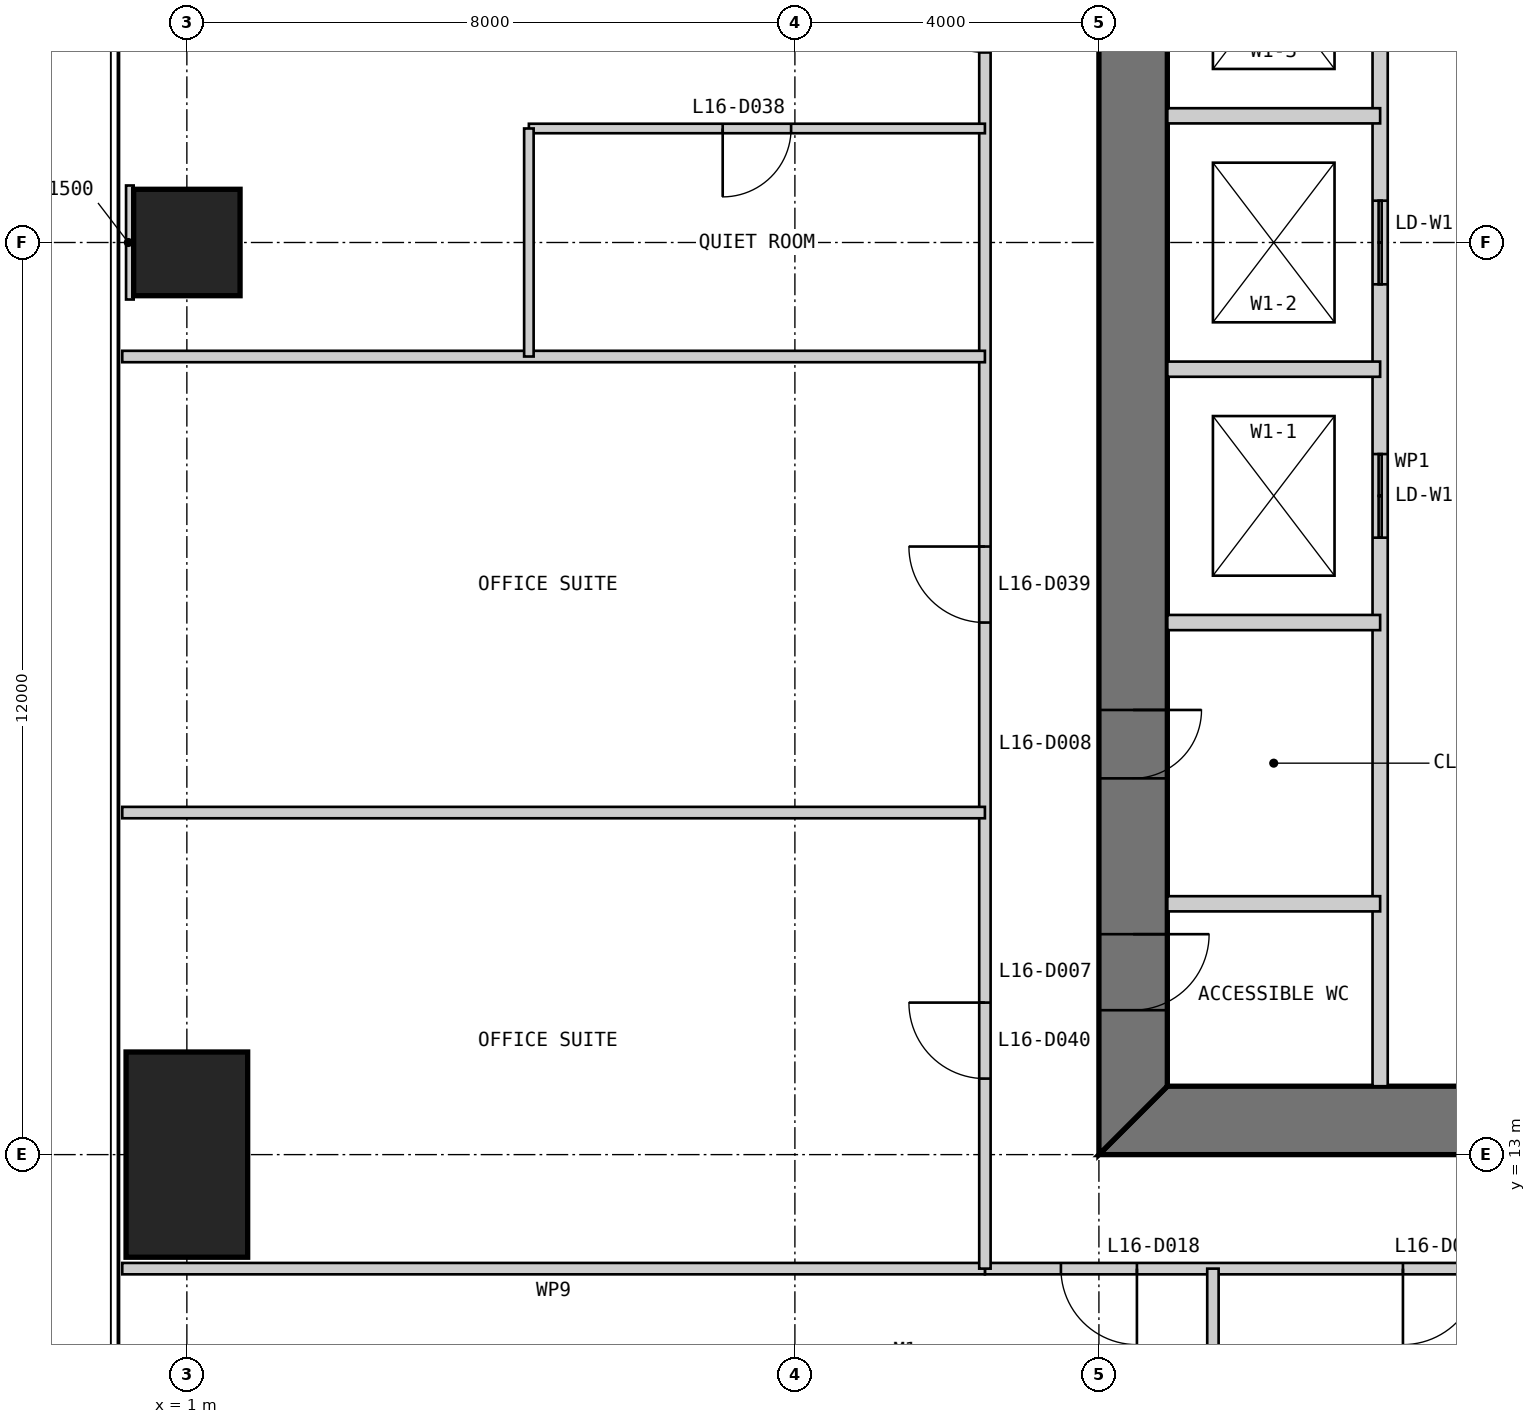
"""IFC4 building model, lengths in metres.
Left out: names, types, materials, properties, quantities, classifications, styles, units other than length and angle.
Written with IfcOpenShell. Run it as: python <this file> out.ifc"""

import sys

from ifc_helpers import new_model, si_unit, direction, frame, frame_2d, origin, origin_2d, place, context, subcontext, project, spatial, polyline, rectangle, outline, extrude, element, fill, save


model = new_model("IFC4")
c1 = context("Model", 3, precision=1e-05, world=origin(), true_north=direction((0.0, 1.0)))
c2 = subcontext(c1, "Body", "Model", "MODEL_VIEW")
j1 = project(units=[si_unit("LENGTHUNIT", "METRE"), si_unit("PLANEANGLEUNIT", "RADIAN")], contexts=[c1])
p1 = place(None, origin())
s1 = spatial("IfcSite", under=j1, at=p1, CompositionType="ELEMENT")
p2 = place(p1, origin())
s2 = spatial("IfcBuilding", under=s1, at=p2, CompositionType="ELEMENT")
p3 = place(p2, frame((0.0, 0.0, 71.0)))
s3 = spatial("IfcBuildingStorey", under=s2, at=p3, CompositionType="ELEMENT", Elevation=71.0)
p4 = place(p3, frame((1.0, 25.0, 0.0), z_axis=(0.0, 0.0, 1.0), x_axis=(1.0, 0.0, 0.0)))
e1 = element("IfcColumn", 1, at=p4, inside=s3, PredefinedType="COLUMN", context=c2, shape_type="SweptSolid", body=[
    extrude(rectangle(XDim=1.4, YDim=1.4, at=origin_2d()), origin(), (0.0, 0.0, 1.0), 4.0),
])
p5 = place(p3, frame((1.0, 13.0, 0.0), z_axis=(0.0, 0.0, 1.0), x_axis=(1.0, 0.0, 0.0)))
e2 = element("IfcColumn", 2, at=p5, inside=s3, PredefinedType="COLUMN", context=c2, shape_type="SweptSolid", body=[
    extrude(rectangle(XDim=1.6, YDim=2.7, at=origin_2d()), origin(), (0.0, 0.0, 1.0), 4.0),
])
p6 = place(p3, frame((13.0, 13.45, 0.0), z_axis=(0.0, 0.0, 1.0), x_axis=(1.0, 0.0, 0.0)))
e3 = element("IfcWall", 3, at=p6, inside=s3, PredefinedType="SHEAR", context=c2, shape_type="SweptSolid", body=[
    extrude(outline(polyline([(0.0, -0.45), (24.0, -0.45), (23.1, 0.45), (0.9, 0.45), (0.0, -0.45)])), origin(), (0.0, 0.0, 1.0), 4.0),
])
p7 = place(p6, frame((4.9, 0.0, 0.0)))
e4 = element("IfcOpeningElement", 4, at=p7, cuts=e3, PredefinedType="OPENING", context=c2, shape_type="SweptSolid", body=[
    extrude(rectangle(XDim=1.0, YDim=2.2, at=frame_2d((0.5, 1.1))), frame((0.0, 0.46, 0.0), z_axis=(0.0, -1.0, 0.0), x_axis=(1.0, 0.0, 0.0)), (0.0, 0.0, 1.0), 0.92),
])
p8 = place(p6, frame((8.9, 0.0, 0.0)))
e5 = element("IfcOpeningElement", 5, at=p8, cuts=e3, PredefinedType="OPENING", context=c2, shape_type="SweptSolid", body=[
    extrude(rectangle(XDim=1.1, YDim=2.2, at=frame_2d((0.55, 1.1))), frame((0.0, 0.46, 0.0), z_axis=(0.0, -1.0, 0.0), x_axis=(1.0, 0.0, 0.0)), (0.0, 0.0, 1.0), 0.92),
])
p9 = place(p6, frame((15.05, 0.0, 0.0)))
e6 = element("IfcOpeningElement", 6, at=p9, cuts=e3, PredefinedType="OPENING", context=c2, shape_type="SweptSolid", body=[
    extrude(rectangle(XDim=0.9, YDim=2.2, at=frame_2d((0.45, 1.1))), frame((0.0, 0.46, 0.0), z_axis=(0.0, -1.0, 0.0), x_axis=(1.0, 0.0, 0.0)), (0.0, 0.0, 1.0), 0.92),
])
p10 = place(p6, frame((17.9, 0.0, 0.0)))
e7 = element("IfcOpeningElement", 7, at=p10, cuts=e3, PredefinedType="OPENING", context=c2, shape_type="SweptSolid", body=[
    extrude(rectangle(XDim=1.0, YDim=2.2, at=frame_2d((0.5, 1.1))), frame((0.0, 0.46, 0.0), z_axis=(0.0, -1.0, 0.0), x_axis=(1.0, 0.0, 0.0)), (0.0, 0.0, 1.0), 0.92),
])
p11 = place(p6, frame((21.4, 0.0, 0.0)))
e8 = element("IfcOpeningElement", 8, at=p11, cuts=e3, PredefinedType="OPENING", context=c2, shape_type="SweptSolid", body=[
    extrude(rectangle(XDim=1.0, YDim=2.2, at=frame_2d((0.5, 1.1))), frame((0.0, 0.46, 0.0), z_axis=(0.0, -1.0, 0.0), x_axis=(1.0, 0.0, 0.0)), (0.0, 0.0, 1.0), 0.92),
])
p12 = place(p3, frame((13.45, 36.1, 0.0), z_axis=(0.0, 0.0, 1.0), x_axis=(0.0, -1.0, 0.0)))
e9 = element("IfcWall", 9, at=p12, inside=s3, PredefinedType="SHEAR", context=c2, shape_type="SweptSolid", body=[
    extrude(outline(polyline([(-0.9, -0.45), (23.1, -0.45), (22.2, 0.45), (0.0, 0.45), (-0.9, -0.45)])), origin(), (0.0, 0.0, 1.0), 4.0),
])
p13 = place(p12, frame((20.2, 0.0, 0.0)))
e10 = element("IfcOpeningElement", 10, at=p13, cuts=e9, PredefinedType="OPENING", context=c2, shape_type="SweptSolid", body=[
    extrude(rectangle(XDim=1.0, YDim=2.2, at=frame_2d((0.5, 1.1))), frame((0.0, 0.46, 0.0), z_axis=(0.0, -1.0, 0.0), x_axis=(1.0, 0.0, 0.0)), (0.0, 0.0, 1.0), 0.92),
])
p14 = place(p12, frame((17.25, 0.0, 0.0)))
e11 = element("IfcOpeningElement", 11, at=p14, cuts=e9, PredefinedType="OPENING", context=c2, shape_type="SweptSolid", body=[
    extrude(rectangle(XDim=0.9, YDim=2.2, at=frame_2d((0.45, 1.1))), frame((0.0, 0.46, 0.0), z_axis=(0.0, -1.0, 0.0), x_axis=(1.0, 0.0, 0.0)), (0.0, 0.0, 1.0), 0.92),
])
p15 = place(p3, frame((16.7, 13.9, 0.0), z_axis=(0.0, 0.0, 1.0), x_axis=(0.0, 1.0, 0.0)))
e12 = element("IfcWall", 12, at=p15, inside=s3, PredefinedType="PARTITIONING", context=c2, shape_type="SweptSolid", body=[
    extrude(rectangle(XDim=16.1, YDim=0.2, at=frame_2d((8.05, 0.0))), origin(), (0.0, 0.0, 1.0), 3.8),
])
p16 = place(p15, frame((7.217, 0.0, 0.0)))
e13 = element("IfcOpeningElement", 13, at=p16, cuts=e12, PredefinedType="OPENING", context=c2, shape_type="SweptSolid", body=[
    extrude(rectangle(XDim=1.1, YDim=2.2, at=frame_2d((0.55, 1.1))), frame((0.0, 0.11, 0.0), z_axis=(0.0, -1.0, 0.0), x_axis=(1.0, 0.0, 0.0)), (0.0, 0.0, 1.0), 0.22),
])
p17 = place(p15, frame((10.55, 0.0, 0.0)))
e14 = element("IfcOpeningElement", 14, at=p17, cuts=e12, PredefinedType="OPENING", context=c2, shape_type="SweptSolid", body=[
    extrude(rectangle(XDim=1.1, YDim=2.2, at=frame_2d((0.55, 1.1))), frame((0.0, 0.11, 0.0), z_axis=(0.0, -1.0, 0.0), x_axis=(1.0, 0.0, 0.0)), (0.0, 0.0, 1.0), 0.22),
])
p18 = place(p15, frame((13.883, 0.0, 0.0)))
e15 = element("IfcOpeningElement", 15, at=p18, cuts=e12, PredefinedType="OPENING", context=c2, shape_type="SweptSolid", body=[
    extrude(rectangle(XDim=1.1, YDim=2.2, at=frame_2d((0.55, 1.1))), frame((0.0, 0.11, 0.0), z_axis=(0.0, -1.0, 0.0), x_axis=(1.0, 0.0, 0.0)), (0.0, 0.0, 1.0), 0.22),
])
for number, where, z_axis, x_axis in (
    (16, (13.9, 20.0, 0.0), (0.0, 0.0, 1.0), (1.0, 0.0, 0.0)),
    (17, (13.9, 23.333, 0.0), (0.0, 0.0, 1.0), (1.0, 0.0, 0.0)),
    (18, (13.9, 26.667, 0.0), (0.0, 0.0, 1.0), (1.0, 0.0, 0.0)),
    (19, (13.9, 16.3, 0.0), (0.0, 0.0, 1.0), (1.0, 0.0, 0.0)),
):
    element("IfcWall", number, at=place(p3, frame(where, z_axis=z_axis, x_axis=x_axis)), inside=s3, PredefinedType="PARTITIONING", context=c2, shape_type="SweptSolid", body=[
        extrude(rectangle(XDim=2.8, YDim=0.2, at=frame_2d((1.4, 0.0))), origin(), (0.0, 0.0, 1.0), 3.8),
    ])
p19 = place(p3, frame((11.5, 11.5, 0.0), z_axis=(0.0, 0.0, 1.0), x_axis=(1.0, 0.0, 0.0)))
e20 = element("IfcWall", 20, at=p19, inside=s3, PredefinedType="PARTITIONING", context=c2, shape_type="SweptSolid", body=[
    extrude(rectangle(XDim=27.0, YDim=0.15, at=frame_2d((13.5, 0.0))), origin(), (0.0, 0.0, 1.0), 3.85),
])
p20 = place(p19, frame((1.0, 0.0, 0.0)))
e21 = element("IfcOpeningElement", 21, at=p20, cuts=e20, PredefinedType="OPENING", context=c2, shape_type="SweptSolid", body=[
    extrude(rectangle(XDim=1.0, YDim=2.2, at=frame_2d((0.5, 1.1))), frame((0.0, 0.085, 0.0), z_axis=(0.0, -1.0, 0.0), x_axis=(1.0, 0.0, 0.0)), (0.0, 0.0, 1.0), 0.17),
])
p21 = place(p19, frame((5.5, 0.0, 0.0)))
e22 = element("IfcOpeningElement", 22, at=p21, cuts=e20, PredefinedType="OPENING", context=c2, shape_type="SweptSolid", body=[
    extrude(rectangle(XDim=1.0, YDim=2.2, at=frame_2d((0.5, 1.1))), frame((0.0, 0.085, 0.0), z_axis=(0.0, -1.0, 0.0), x_axis=(1.0, 0.0, 0.0)), (0.0, 0.0, 1.0), 0.17),
])
p22 = place(p19, frame((11.5, 0.0, 0.0)))
e23 = element("IfcOpeningElement", 23, at=p22, cuts=e20, PredefinedType="OPENING", context=c2, shape_type="SweptSolid", body=[
    extrude(rectangle(XDim=1.0, YDim=2.2, at=frame_2d((0.5, 1.1))), frame((0.0, 0.085, 0.0), z_axis=(0.0, -1.0, 0.0), x_axis=(1.0, 0.0, 0.0)), (0.0, 0.0, 1.0), 0.17),
])
p23 = place(p19, frame((19.0, 0.0, 0.0)))
e24 = element("IfcOpeningElement", 24, at=p23, cuts=e20, PredefinedType="OPENING", context=c2, shape_type="SweptSolid", body=[
    extrude(rectangle(XDim=1.0, YDim=2.2, at=frame_2d((0.5, 1.1))), frame((0.0, 0.085, 0.0), z_axis=(0.0, -1.0, 0.0), x_axis=(1.0, 0.0, 0.0)), (0.0, 0.0, 1.0), 0.17),
])
for number, where, z_axis, x_axis in (
    (25, (0.15, 11.5, 0.0), (0.0, 0.0, 1.0), (1.0, 0.0, 0.0)),
    (26, (14.5, 0.15, 0.0), (0.0, 0.0, 1.0), (0.0, 1.0, 0.0)),
):
    element("IfcWall", number, at=place(p3, frame(where, z_axis=z_axis, x_axis=x_axis)), inside=s3, PredefinedType="PARTITIONING", context=c2, shape_type="SweptSolid", body=[
        extrude(rectangle(XDim=11.35, YDim=0.15, at=frame_2d((5.675, 0.0))), origin(), (0.0, 0.0, 1.0), 3.85),
    ])
p24 = place(p3, frame((11.5, 38.5, 0.0), z_axis=(0.0, 0.0, 1.0), x_axis=(0.0, -1.0, 0.0)))
e27 = element("IfcWall", 27, at=p24, inside=s3, PredefinedType="PARTITIONING", context=c2, shape_type="SweptSolid", body=[
    extrude(rectangle(XDim=27.0, YDim=0.15, at=frame_2d((13.5, 0.0))), origin(), (0.0, 0.0, 1.0), 3.85),
])
p25 = place(p24, frame((4.0, 0.0, 0.0)))
e28 = element("IfcOpeningElement", 28, at=p25, cuts=e27, PredefinedType="OPENING", context=c2, shape_type="SweptSolid", body=[
    extrude(rectangle(XDim=1.0, YDim=2.2, at=frame_2d((0.5, 1.1))), frame((0.0, 0.085, 0.0), z_axis=(0.0, -1.0, 0.0), x_axis=(1.0, 0.0, 0.0)), (0.0, 0.0, 1.0), 0.17),
])
p26 = place(p24, frame((10.0, 0.0, 0.0)))
e29 = element("IfcOpeningElement", 29, at=p26, cuts=e27, PredefinedType="OPENING", context=c2, shape_type="SweptSolid", body=[
    extrude(rectangle(XDim=1.0, YDim=2.2, at=frame_2d((0.5, 1.1))), frame((0.0, 0.085, 0.0), z_axis=(0.0, -1.0, 0.0), x_axis=(1.0, 0.0, 0.0)), (0.0, 0.0, 1.0), 0.17),
])
p27 = place(p24, frame((17.5, 0.0, 0.0)))
e30 = element("IfcOpeningElement", 30, at=p27, cuts=e27, PredefinedType="OPENING", context=c2, shape_type="SweptSolid", body=[
    extrude(rectangle(XDim=1.0, YDim=2.2, at=frame_2d((0.5, 1.1))), frame((0.0, 0.085, 0.0), z_axis=(0.0, -1.0, 0.0), x_axis=(1.0, 0.0, 0.0)), (0.0, 0.0, 1.0), 0.17),
])
p28 = place(p24, frame((23.5, 0.0, 0.0)))
e31 = element("IfcOpeningElement", 31, at=p28, cuts=e27, PredefinedType="OPENING", context=c2, shape_type="SweptSolid", body=[
    extrude(rectangle(XDim=1.0, YDim=2.2, at=frame_2d((0.5, 1.1))), frame((0.0, 0.085, 0.0), z_axis=(0.0, -1.0, 0.0), x_axis=(1.0, 0.0, 0.0)), (0.0, 0.0, 1.0), 0.17),
])
p29 = place(p3, frame((5.5, 26.5, 0.0), z_axis=(0.0, 0.0, 1.0), x_axis=(1.0, 0.0, 0.0)))
e32 = element("IfcWall", 32, at=p29, inside=s3, PredefinedType="PARTITIONING", context=c2, shape_type="SweptSolid", body=[
    extrude(rectangle(XDim=6.0, YDim=0.125, at=frame_2d((3.0, 0.0))), origin(), (0.0, 0.0, 1.0), 3.85),
])
p30 = place(p29, frame((2.55, 0.0, 0.0)))
e33 = element("IfcOpeningElement", 33, at=p30, cuts=e32, PredefinedType="OPENING", context=c2, shape_type="SweptSolid", body=[
    extrude(rectangle(XDim=0.9, YDim=2.2, at=frame_2d((0.45, 1.1))), frame((0.0, 0.073, 0.0), z_axis=(0.0, -1.0, 0.0), x_axis=(1.0, 0.0, 0.0)), (0.0, 0.0, 1.0), 0.145),
])
for number, where, z_axis, x_axis in (
    (34, (0.15, 23.5, 0.0), (0.0, 0.0, 1.0), (1.0, 0.0, 0.0)),
    (35, (0.15, 17.5, 0.0), (0.0, 0.0, 1.0), (1.0, 0.0, 0.0)),
):
    element("IfcWall", number, at=place(p3, frame(where, z_axis=z_axis, x_axis=x_axis)), inside=s3, PredefinedType="PARTITIONING", context=c2, shape_type="SweptSolid", body=[
        extrude(rectangle(XDim=11.35, YDim=0.15, at=frame_2d((5.675, 0.0))), origin(), (0.0, 0.0, 1.0), 3.85),
    ])
p31 = place(p3, frame((5.5, 26.5, 0.0), z_axis=(0.0, 0.0, 1.0), x_axis=(0.0, -1.0, 0.0)))
e36 = element("IfcWall", 36, at=p31, inside=s3, PredefinedType="PARTITIONING", context=c2, shape_type="SweptSolid", body=[
    extrude(rectangle(XDim=3.0, YDim=0.125, at=frame_2d((1.5, 0.0))), origin(), (0.0, 0.0, 1.0), 3.85),
])
p32 = place(p3, frame((0.2, 25.0, 0.0), z_axis=(0.0, 0.0, 1.0), x_axis=(1.0, 0.0, 0.0)))
e37 = element("IfcWall", 37, at=p32, inside=s3, PredefinedType="PARTITIONING", context=c2, shape_type="SweptSolid", body=[
    extrude(rectangle(XDim=0.1, YDim=1.5, at=frame_2d((0.05, 0.0))), origin(), (0.0, 0.0, 1.0), 3.85),
])
p33 = place(p13, origin())
e38 = element("IfcDoor", 38, at=p33, inside=s3, OperationType="SINGLE_SWING_LEFT", PredefinedType="DOOR", context=c2, shape_type="SweptSolid", body=[
    extrude(rectangle(XDim=1.0, YDim=2.2, at=frame_2d((0.5, 1.1))), frame((0.0, 0.025, 0.0), z_axis=(0.0, -1.0, 0.0), x_axis=(1.0, 0.0, 0.0)), (0.0, 0.0, 1.0), 0.05),
    extrude(outline(polyline([(0.0, 0.0), (0.04, 0.0), (0.04, 2.16), (0.96, 2.16), (0.96, 0.0), (1.0, 0.0), (1.0, 2.2), (0.0, 2.2), (0.0, 0.0)])), frame((0.0, 0.3, 0.0), z_axis=(0.0, -1.0, 0.0), x_axis=(1.0, 0.0, 0.0)), (0.0, 0.0, 1.0), 0.6),
])
fill(e10, e38)
p34 = place(p14, origin())
e39 = element("IfcDoor", 39, at=p34, inside=s3, OperationType="SINGLE_SWING_LEFT", PredefinedType="DOOR", context=c2, shape_type="SweptSolid", body=[
    extrude(rectangle(XDim=0.9, YDim=2.2, at=frame_2d((0.45, 1.1))), frame((0.0, 0.025, 0.0), z_axis=(0.0, -1.0, 0.0), x_axis=(1.0, 0.0, 0.0)), (0.0, 0.0, 1.0), 0.05),
    extrude(outline(polyline([(0.0, 0.0), (0.04, 0.0), (0.04, 2.16), (0.86, 2.16), (0.86, 0.0), (0.9, 0.0), (0.9, 2.2), (0.0, 2.2), (0.0, 0.0)])), frame((0.0, 0.3, 0.0), z_axis=(0.0, -1.0, 0.0), x_axis=(1.0, 0.0, 0.0)), (0.0, 0.0, 1.0), 0.6),
])
fill(e11, e39)
p35 = place(p20, frame((1.0, 0.0, 0.0), z_axis=(0.0, 0.0, 1.0), x_axis=(-1.0, 0.0, 0.0)))
e40 = element("IfcDoor", 40, at=p35, inside=s3, OperationType="SINGLE_SWING_LEFT", PredefinedType="DOOR", context=c2, shape_type="SweptSolid", body=[
    extrude(rectangle(XDim=1.0, YDim=2.2, at=frame_2d((0.5, 1.1))), frame((0.0, 0.025, 0.0), z_axis=(0.0, -1.0, 0.0), x_axis=(1.0, 0.0, 0.0)), (0.0, 0.0, 1.0), 0.05),
])
fill(e21, e40)
p36 = place(p21, frame((1.0, 0.0, 0.0), z_axis=(0.0, 0.0, 1.0), x_axis=(-1.0, 0.0, 0.0)))
e41 = element("IfcDoor", 41, at=p36, inside=s3, OperationType="SINGLE_SWING_RIGHT", PredefinedType="DOOR", context=c2, shape_type="SweptSolid", body=[
    extrude(rectangle(XDim=1.0, YDim=2.2, at=frame_2d((0.5, 1.1))), frame((0.0, 0.025, 0.0), z_axis=(0.0, -1.0, 0.0), x_axis=(1.0, 0.0, 0.0)), (0.0, 0.0, 1.0), 0.05),
])
fill(e22, e41)
p37 = place(p30, frame((0.9, 0.0, 0.0), z_axis=(0.0, 0.0, 1.0), x_axis=(-1.0, 0.0, 0.0)))
e42 = element("IfcDoor", 42, at=p37, inside=s3, OperationType="SINGLE_SWING_RIGHT", PredefinedType="DOOR", context=c2, shape_type="SweptSolid", body=[
    extrude(rectangle(XDim=0.9, YDim=2.2, at=frame_2d((0.45, 1.1))), frame((0.0, 0.025, 0.0), z_axis=(0.0, -1.0, 0.0), x_axis=(1.0, 0.0, 0.0)), (0.0, 0.0, 1.0), 0.05),
])
fill(e33, e42)
p38 = place(p27, frame((1.0, 0.0, 0.0), z_axis=(0.0, 0.0, 1.0), x_axis=(-1.0, 0.0, 0.0)))
e43 = element("IfcDoor", 43, at=p38, inside=s3, OperationType="SINGLE_SWING_RIGHT", PredefinedType="DOOR", context=c2, shape_type="SweptSolid", body=[
    extrude(rectangle(XDim=1.0, YDim=2.2, at=frame_2d((0.5, 1.1))), frame((0.0, 0.025, 0.0), z_axis=(0.0, -1.0, 0.0), x_axis=(1.0, 0.0, 0.0)), (0.0, 0.0, 1.0), 0.05),
])
fill(e30, e43)
p39 = place(p28, frame((1.0, 0.0, 0.0), z_axis=(0.0, 0.0, 1.0), x_axis=(-1.0, 0.0, 0.0)))
e44 = element("IfcDoor", 44, at=p39, inside=s3, OperationType="SINGLE_SWING_RIGHT", PredefinedType="DOOR", context=c2, shape_type="SweptSolid", body=[
    extrude(rectangle(XDim=1.0, YDim=2.2, at=frame_2d((0.5, 1.1))), frame((0.0, 0.025, 0.0), z_axis=(0.0, -1.0, 0.0), x_axis=(1.0, 0.0, 0.0)), (0.0, 0.0, 1.0), 0.05),
])
fill(e31, e44)
p40 = place(p16, origin())
e45 = element("IfcDoor", 45, at=p40, inside=s3, OperationType="DOUBLE_DOOR_SLIDING", PredefinedType="DOOR", context=c2, shape_type="SweptSolid", body=[
    extrude(rectangle(XDim=1.1, YDim=2.2, at=frame_2d((0.55, 1.1))), frame((0.0, 0.025, 0.0), z_axis=(0.0, -1.0, 0.0), x_axis=(1.0, 0.0, 0.0)), (0.0, 0.0, 1.0), 0.05),
])
fill(e13, e45)
p41 = place(p17, origin())
e46 = element("IfcDoor", 46, at=p41, inside=s3, OperationType="DOUBLE_DOOR_SLIDING", PredefinedType="DOOR", context=c2, shape_type="SweptSolid", body=[
    extrude(rectangle(XDim=1.1, YDim=2.2, at=frame_2d((0.55, 1.1))), frame((0.0, 0.025, 0.0), z_axis=(0.0, -1.0, 0.0), x_axis=(1.0, 0.0, 0.0)), (0.0, 0.0, 1.0), 0.05),
])
fill(e14, e46)
save(model, sys.argv[1])
